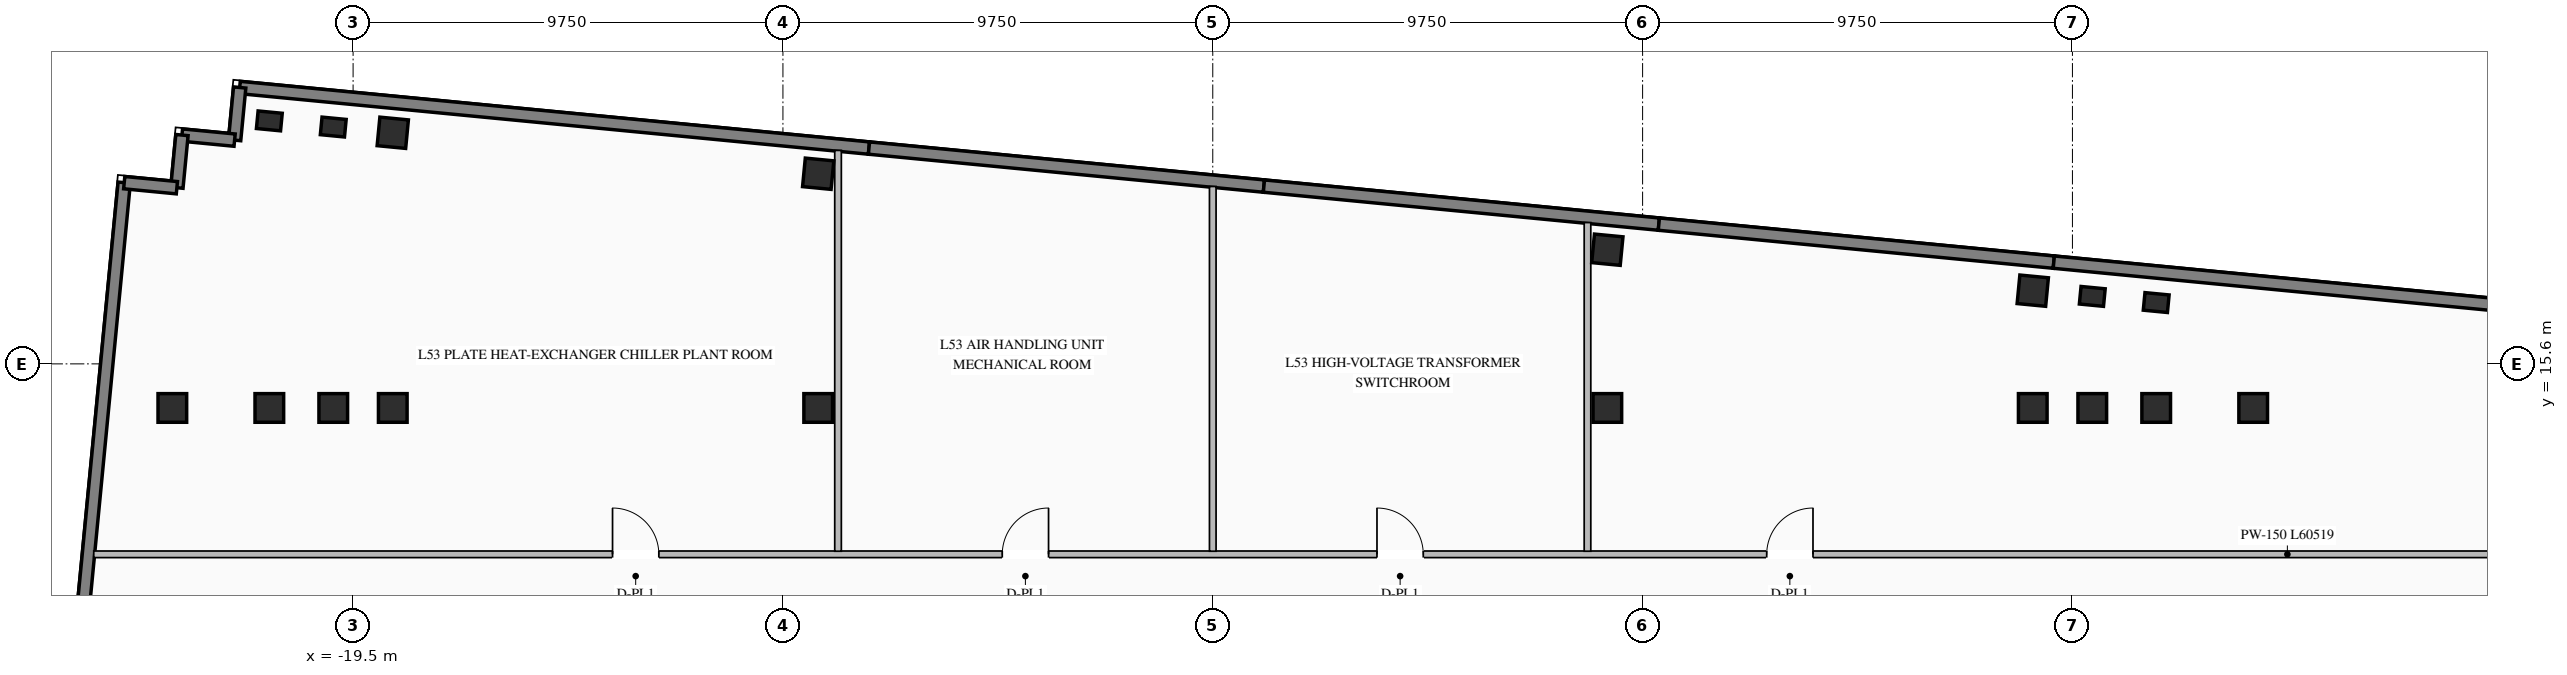
"""IFC4 building model, lengths in metres.
Left out: names, types, materials, properties, quantities, classifications, styles, units other than length and angle.
Written with IfcOpenShell. Run it as: python <this file> out.ifc"""

import sys

from ifc_helpers import new_model, si_unit, direction, frame, frame_2d, origin, origin_2d, place, context, subcontext, project, spatial, rectangle, i_section, extrude, element, fill, save


model = new_model("IFC4")
c1 = context("Model", 3, precision=1e-05, world=origin(), true_north=direction((0.0, 1.0)))
c2 = subcontext(c1, "Body", "Model", "MODEL_VIEW")
j1 = project(units=[si_unit("LENGTHUNIT", "METRE"), si_unit("PLANEANGLEUNIT", "RADIAN")], contexts=[c1])
p1 = place(None, origin())
s1 = spatial("IfcSite", under=j1, at=p1, CompositionType="ELEMENT")
p2 = place(p1, origin())
s2 = spatial("IfcBuilding", under=s1, at=p2, CompositionType="ELEMENT")
p3 = place(p2, frame((0.0, 0.0, 194.9)))
s3 = spatial("IfcBuildingStorey", under=s2, at=p3, CompositionType="ELEMENT", Elevation=194.9)
for number, where, z_axis, x_axis in (
    (1, (-21.4, 14.6, 0.0), (0.0, 0.0, 1.0), (1.0, 0.0, 0.0)),
    (2, (-19.95, 14.6, 0.0), (0.0, 0.0, 1.0), (1.0, 0.0, 0.0)),
    (3, (-18.6, 14.6, 0.0), (0.0, 0.0, 1.0), (1.0, 0.0, 0.0)),
    (4, (-8.95, 14.6, 0.0), (0.0, 0.0, 1.0), (1.0, 0.0, 0.0)),
    (5, (8.95, 14.6, 0.0), (0.0, 0.0, 1.0), (1.0, 0.0, 0.0)),
    (6, (18.6, 14.6, 0.0), (0.0, 0.0, 1.0), (1.0, 0.0, 0.0)),
    (7, (19.95, 14.6, 0.0), (0.0, 0.0, 1.0), (1.0, 0.0, 0.0)),
    (8, (21.4, 14.6, 0.0), (0.0, 0.0, 1.0), (1.0, 0.0, 0.0)),
    (9, (-23.6, 14.6, 0.0), (0.0, 0.0, 1.0), (1.0, 0.0, 0.0)),
    (10, (23.6, 14.6, 0.0), (0.0, 0.0, 1.0), (1.0, 0.0, 0.0)),
    (11, (-18.6, 20.842, 0.0), (0.0, 0.0, 1.0), (0.995, -0.096, 0.0)),
    (12, (-8.95, 19.913, 0.0), (0.0, 0.0, 1.0), (0.995, -0.096, 0.0)),
    (13, (8.95, 18.19, 0.0), (0.0, 0.0, 1.0), (0.995, -0.096, 0.0)),
    (14, (18.6, 17.26, 0.0), (0.0, 0.0, 1.0), (0.995, -0.096, 0.0)),
):
    element("IfcColumn", number, at=place(p3, frame(where, z_axis=z_axis, x_axis=x_axis)), inside=s3, PredefinedType="COLUMN", context=c2, shape_type="SweptSolid", body=[
        extrude(i_section(OverallWidth=0.65, OverallDepth=0.65, WebThickness=0.028, FlangeThickness=0.04, at=origin_2d()), origin(), (0.0, 0.0, 1.0), 4.6),
    ])
for number, where, z_axis, x_axis in (
    (15, (-21.4, 21.112, 0.0), (0.0, 0.0, 1.0), (0.995, -0.096, 0.0)),
    (16, (-19.95, 20.972, 0.0), (0.0, 0.0, 1.0), (0.995, -0.096, 0.0)),
    (17, (19.95, 17.131, 0.0), (0.0, 0.0, 1.0), (0.995, -0.096, 0.0)),
    (18, (21.4, 16.991, 0.0), (0.0, 0.0, 1.0), (0.995, -0.096, 0.0)),
):
    element("IfcColumn", number, at=place(p3, frame(where, z_axis=z_axis, x_axis=x_axis)), inside=s3, PredefinedType="PILASTER", context=c2, shape_type="SweptSolid", body=[
        extrude(rectangle(XDim=0.55, YDim=0.4, at=origin_2d()), origin(), (0.0, 0.0, 1.0), 4.6),
    ])
p4 = place(p3, frame((-22.073, 21.87, 0.0), z_axis=(0.0, 0.0, 1.0), x_axis=(0.995395606285, -0.095851901334, 0.0)))
e19 = element("IfcWall", 19, at=p4, inside=s3, PredefinedType="STANDARD", context=c2, shape_type="SweptSolid", body=[
    extrude(rectangle(XDim=14.34, YDim=0.28, at=frame_2d((7.17, 0.0))), origin(), (0.0, 0.0, 1.0), 4.3),
])
p5 = place(p3, frame((-7.799, 20.496, 0.0), z_axis=(0.0, 0.0, 1.0), x_axis=(0.995396794462, -0.09583956164, 0.0)))
e20 = element("IfcWall", 20, at=p5, inside=s3, PredefinedType="STANDARD", context=c2, shape_type="SweptSolid", body=[
    extrude(rectangle(XDim=9.0, YDim=0.28, at=frame_2d((4.5, 0.0))), origin(), (0.0, 0.0, 1.0), 4.3),
])
p6 = place(p3, frame((1.16, 19.633, 0.0), z_axis=(0.0, 0.0, 1.0), x_axis=(0.995394455533, -0.09586385082, 0.0)))
e21 = element("IfcWall", 21, at=p6, inside=s3, PredefinedType="STANDARD", context=c2, shape_type="SweptSolid", body=[
    extrude(rectangle(XDim=9.0, YDim=0.28, at=frame_2d((4.5, 0.0))), origin(), (0.0, 0.0, 1.0), 4.3),
])
p7 = place(p3, frame((10.119, 18.77, 0.0), z_axis=(0.0, 0.0, 1.0), x_axis=(0.995396794462, -0.09583956164, 0.0)))
e22 = element("IfcWall", 22, at=p7, inside=s3, PredefinedType="STANDARD", context=c2, shape_type="SweptSolid", body=[
    extrude(rectangle(XDim=9.0, YDim=0.28, at=frame_2d((4.5, 0.0))), origin(), (0.0, 0.0, 1.0), 4.3),
])
p8 = place(p3, frame((19.077, 17.908, 0.0), z_axis=(0.0, 0.0, 1.0), x_axis=(0.995395606285, -0.095851901334, 0.0)))
e23 = element("IfcWall", 23, at=p8, inside=s3, PredefinedType="STANDARD", context=c2, shape_type="SweptSolid", body=[
    extrude(rectangle(XDim=14.34, YDim=0.28, at=frame_2d((7.17, 0.0))), origin(), (0.0, 0.0, 1.0), 4.3),
])
p9 = place(p3, frame((-26.301, 2.998, 0.0), z_axis=(0.0, 0.0, 1.0), x_axis=(0.095837640115, 0.99539697947, 0.0)))
e24 = element("IfcWall", 24, at=p9, inside=s3, PredefinedType="STANDARD", context=c2, shape_type="SweptSolid", body=[
    extrude(rectangle(XDim=16.79, YDim=0.28, at=frame_2d((8.395, 0.0))), origin(), (0.0, 0.0, 1.0), 4.3),
])
for number, where, z_axis, x_axis in (
    (25, (-22.073, 21.87, 0.0), (0.0, 0.0, 1.0), (-0.096, -0.995, 0.0)),
    (26, (-22.188, 20.676, 0.0), (0.0, 0.0, 1.0), (-0.995, 0.096, 0.0)),
    (27, (-23.382, 20.791, 0.0), (0.0, 0.0, 1.0), (-0.096, -0.995, 0.0)),
    (28, (-23.497, 19.596, 0.0), (0.0, 0.0, 1.0), (-0.995, 0.096, 0.0)),
):
    element("IfcWall", number, at=place(p3, frame(where, z_axis=z_axis, x_axis=x_axis)), inside=s3, PredefinedType="STANDARD", context=c2, shape_type="SweptSolid", body=[
        extrude(rectangle(XDim=1.2, YDim=0.28, at=frame_2d((0.6, 0.0))), origin(), (0.0, 0.0, 1.0), 4.3),
    ])
p10 = place(p3, frame((-25.383, 11.28, 0.0), z_axis=(0.0, 0.0, 1.0), x_axis=(1.0, 0.0, 0.0)))
e29 = element("IfcWall", 29, at=p10, inside=s3, PredefinedType="STANDARD", context=c2, shape_type="SweptSolid", body=[
    extrude(rectangle(XDim=60.519, YDim=0.15, at=frame_2d((30.259, 0.0))), origin(), (0.0, 0.0, 1.0), 4.3),
])
p11 = place(p10, frame((11.768, 0.0, 0.0)))
e30 = element("IfcOpeningElement", 30, at=p11, cuts=e29, PredefinedType="OPENING", context=c2, shape_type="SweptSolid", body=[
    extrude(rectangle(XDim=1.05, YDim=2.08, at=frame_2d((0.525, 1.04))), frame((0.0, 0.085, 0.0), z_axis=(0.0, -1.0, 0.0), x_axis=(1.0, 0.0, 0.0)), (0.0, 0.0, 1.0), 0.17),
])
p12 = place(p10, frame((20.608, 0.0, 0.0)))
e31 = element("IfcOpeningElement", 31, at=p12, cuts=e29, PredefinedType="OPENING", context=c2, shape_type="SweptSolid", body=[
    extrude(rectangle(XDim=1.05, YDim=2.08, at=frame_2d((0.525, 1.04))), frame((0.0, 0.085, 0.0), z_axis=(0.0, -1.0, 0.0), x_axis=(1.0, 0.0, 0.0)), (0.0, 0.0, 1.0), 0.17),
])
p13 = place(p10, frame((29.108, 0.0, 0.0)))
e32 = element("IfcOpeningElement", 32, at=p13, cuts=e29, PredefinedType="OPENING", context=c2, shape_type="SweptSolid", body=[
    extrude(rectangle(XDim=1.05, YDim=2.08, at=frame_2d((0.525, 1.04))), frame((0.0, 0.085, 0.0), z_axis=(0.0, -1.0, 0.0), x_axis=(1.0, 0.0, 0.0)), (0.0, 0.0, 1.0), 0.17),
])
p14 = place(p10, frame((37.948, 0.0, 0.0)))
e33 = element("IfcOpeningElement", 33, at=p14, cuts=e29, PredefinedType="OPENING", context=c2, shape_type="SweptSolid", body=[
    extrude(rectangle(XDim=1.05, YDim=2.08, at=frame_2d((0.525, 1.04))), frame((0.0, 0.085, 0.0), z_axis=(0.0, -1.0, 0.0), x_axis=(1.0, 0.0, 0.0)), (0.0, 0.0, 1.0), 0.17),
])
p15 = place(p3, frame((-8.5, 11.35, 0.0), z_axis=(0.0, 0.0, 1.0), x_axis=(0.0, 1.0, 0.0)))
e34 = element("IfcWall", 34, at=p15, inside=s3, PredefinedType="STANDARD", context=c2, shape_type="SweptSolid", body=[
    extrude(rectangle(XDim=9.093, YDim=0.15, at=frame_2d((4.546, 0.0))), origin(), (0.0, 0.0, 1.0), 4.3),
])
p16 = place(p3, frame((0.0, 11.35, 0.0), z_axis=(0.0, 0.0, 1.0), x_axis=(0.0, 1.0, 0.0)))
e35 = element("IfcWall", 35, at=p16, inside=s3, PredefinedType="STANDARD", context=c2, shape_type="SweptSolid", body=[
    extrude(rectangle(XDim=8.274, YDim=0.15, at=frame_2d((4.137, 0.0))), origin(), (0.0, 0.0, 1.0), 4.3),
])
p17 = place(p3, frame((8.5, 11.35, 0.0), z_axis=(0.0, 0.0, 1.0), x_axis=(0.0, 1.0, 0.0)))
e36 = element("IfcWall", 36, at=p17, inside=s3, PredefinedType="STANDARD", context=c2, shape_type="SweptSolid", body=[
    extrude(rectangle(XDim=7.456, YDim=0.15, at=frame_2d((3.728, 0.0))), origin(), (0.0, 0.0, 1.0), 4.3),
])
p18 = place(p11, origin())
e37 = element("IfcDoor", 37, at=p18, inside=s3, OperationType="SINGLE_SWING_LEFT", PredefinedType="DOOR", context=c2, shape_type="SweptSolid", body=[
    extrude(rectangle(XDim=1.05, YDim=2.08, at=frame_2d((0.525, 1.04))), frame((0.0, 0.025, 0.0), z_axis=(0.0, -1.0, 0.0), x_axis=(1.0, 0.0, 0.0)), (0.0, 0.0, 1.0), 0.05),
])
fill(e30, e37)
p19 = place(p12, origin())
e38 = element("IfcDoor", 38, at=p19, inside=s3, OperationType="SINGLE_SWING_RIGHT", PredefinedType="DOOR", context=c2, shape_type="SweptSolid", body=[
    extrude(rectangle(XDim=1.05, YDim=2.08, at=frame_2d((0.525, 1.04))), frame((0.0, 0.025, 0.0), z_axis=(0.0, -1.0, 0.0), x_axis=(1.0, 0.0, 0.0)), (0.0, 0.0, 1.0), 0.05),
])
fill(e31, e38)
p20 = place(p13, origin())
e39 = element("IfcDoor", 39, at=p20, inside=s3, OperationType="SINGLE_SWING_LEFT", PredefinedType="DOOR", context=c2, shape_type="SweptSolid", body=[
    extrude(rectangle(XDim=1.05, YDim=2.08, at=frame_2d((0.525, 1.04))), frame((0.0, 0.025, 0.0), z_axis=(0.0, -1.0, 0.0), x_axis=(1.0, 0.0, 0.0)), (0.0, 0.0, 1.0), 0.05),
])
fill(e32, e39)
p21 = place(p14, origin())
e40 = element("IfcDoor", 40, at=p21, inside=s3, OperationType="SINGLE_SWING_RIGHT", PredefinedType="DOOR", context=c2, shape_type="SweptSolid", body=[
    extrude(rectangle(XDim=1.05, YDim=2.08, at=frame_2d((0.525, 1.04))), frame((0.0, 0.025, 0.0), z_axis=(0.0, -1.0, 0.0), x_axis=(1.0, 0.0, 0.0)), (0.0, 0.0, 1.0), 0.05),
])
fill(e33, e40)
save(model, sys.argv[1])
